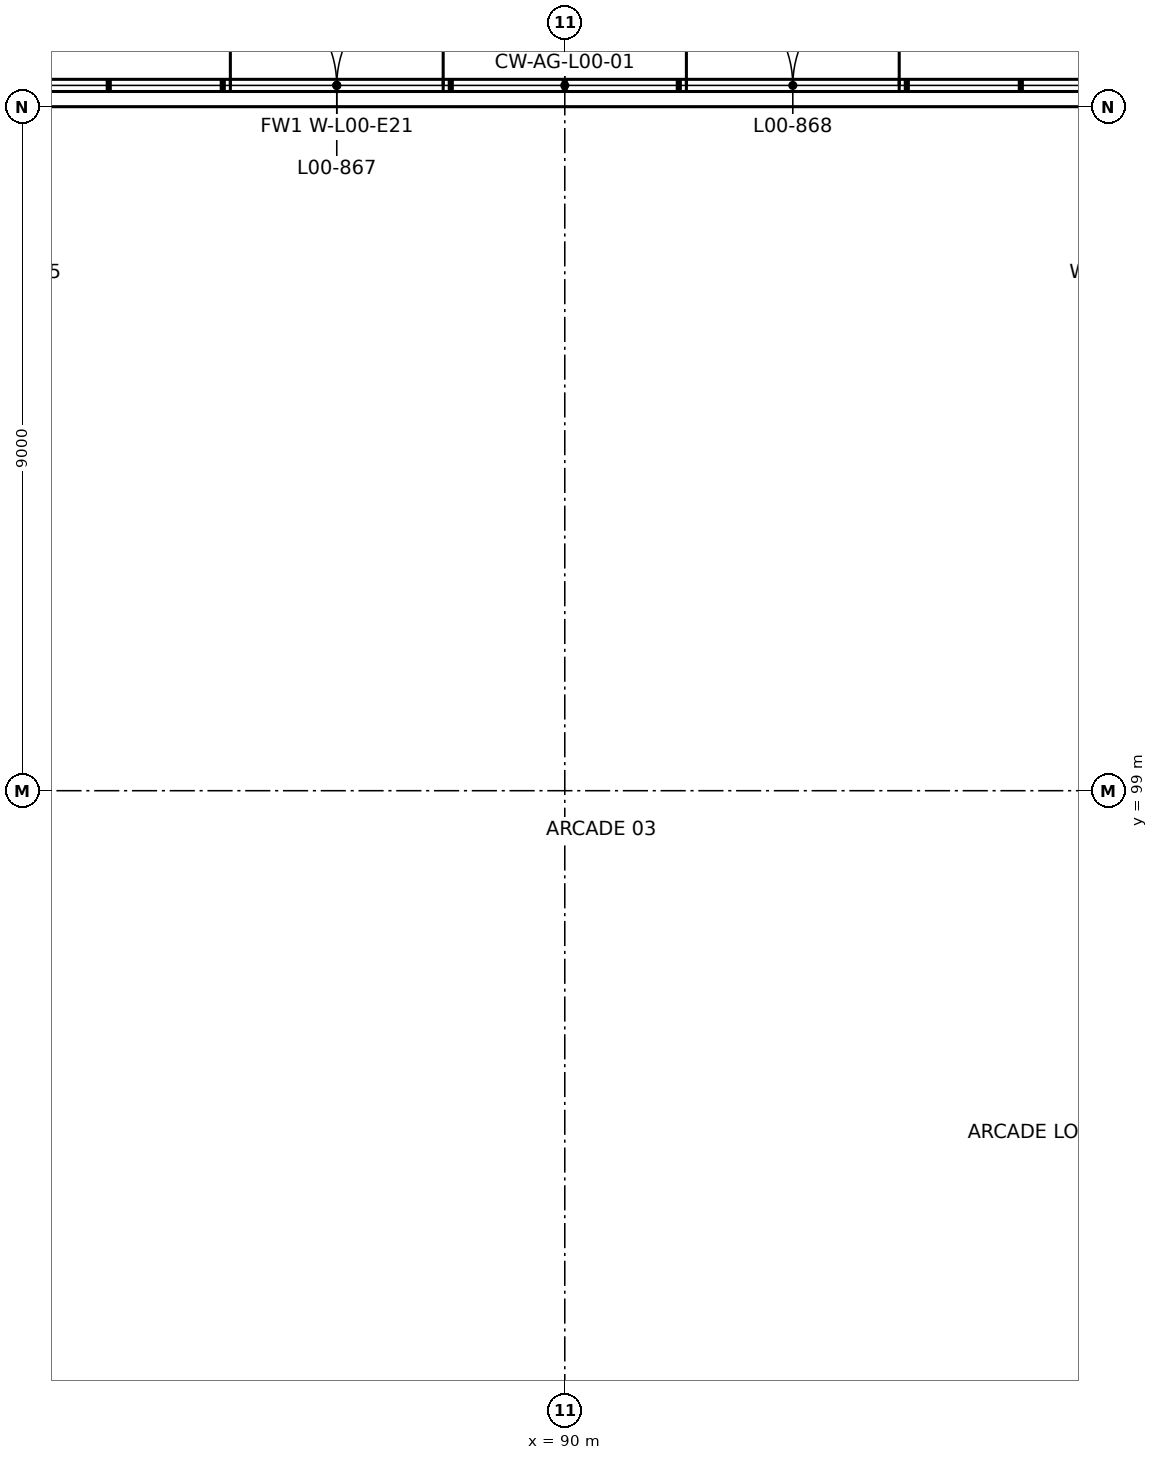
"""IFC4 building model, lengths in metres.
Left out: names, types, materials, properties, quantities, classifications, styles, units other than length and angle.
Written with IfcOpenShell. Run it as: python <this file> out.ifc"""

import sys

from ifc_helpers import new_model, si_unit, direction, frame, frame_2d, origin, place, context, subcontext, project, spatial, rectangle, extrude, element, fill, save


model = new_model("IFC4")
c1 = context("Model", 3, precision=1e-05, world=origin(), true_north=direction((0.0, 1.0)))
c2 = subcontext(c1, "Body", "Model", "MODEL_VIEW")
j1 = project(units=[si_unit("LENGTHUNIT", "METRE"), si_unit("PLANEANGLEUNIT", "RADIAN")], contexts=[c1])
p1 = place(None, origin())
s1 = spatial("IfcSite", under=j1, at=p1, CompositionType="ELEMENT")
p2 = place(p1, origin())
s2 = spatial("IfcBuilding", under=s1, at=p2, CompositionType="ELEMENT")
p3 = place(p2, origin())
s3 = spatial("IfcBuildingStorey", under=s2, at=p3, CompositionType="ELEMENT", Elevation=0.0)
p4 = place(p3, frame((85.53, 108.28, 0.0), z_axis=(0.0, 0.0, 1.0), x_axis=(1.0, 0.0, 0.0)))
e1 = element("IfcWall", 1, at=p4, inside=s3, PredefinedType="STANDARD", context=c2, shape_type="SweptSolid", body=[
    extrude(rectangle(XDim=2.94, YDim=0.12, at=frame_2d((1.47, 0.0))), origin(), (0.0, 0.0, 1.0), 2.97),
])
p5 = place(p4, frame((0.07, 0.0, 0.0)))
e2 = element("IfcOpeningElement", 2, at=p5, cuts=e1, PredefinedType="OPENING", context=c2, shape_type="SweptSolid", body=[
    extrude(rectangle(XDim=2.8, YDim=2.4, at=frame_2d((1.4, 1.2))), frame((0.0, 0.07, 0.0), z_axis=(0.0, -1.0, 0.0), x_axis=(1.0, 0.0, 0.0)), (0.0, 0.0, 1.0), 0.14),
])
p6 = place(p3, frame((91.53, 108.28, 0.0), z_axis=(0.0, 0.0, 1.0), x_axis=(1.0, 0.0, 0.0)))
e3 = element("IfcWall", 3, at=p6, inside=s3, PredefinedType="STANDARD", context=c2, shape_type="SweptSolid", body=[
    extrude(rectangle(XDim=2.94, YDim=0.12, at=frame_2d((1.47, 0.0))), origin(), (0.0, 0.0, 1.0), 2.97),
])
p7 = place(p6, frame((0.07, 0.0, 0.0)))
e4 = element("IfcOpeningElement", 4, at=p7, cuts=e3, PredefinedType="OPENING", context=c2, shape_type="SweptSolid", body=[
    extrude(rectangle(XDim=2.8, YDim=2.4, at=frame_2d((1.4, 1.2))), frame((0.0, 0.07, 0.0), z_axis=(0.0, -1.0, 0.0), x_axis=(1.0, 0.0, 0.0)), (0.0, 0.0, 1.0), 0.14),
])
p8 = place(p5, origin())
e5 = element("IfcDoor", 5, at=p8, inside=s3, OperationType="DOUBLE_DOOR_SINGLE_SWING", PredefinedType="DOOR", context=c2, shape_type="SweptSolid", body=[
    extrude(rectangle(XDim=2.8, YDim=2.4, at=frame_2d((1.4, 1.2))), frame((0.0, 0.025, 0.0), z_axis=(0.0, -1.0, 0.0), x_axis=(1.0, 0.0, 0.0)), (0.0, 0.0, 1.0), 0.05),
])
fill(e2, e5)
p9 = place(p7, origin())
e6 = element("IfcDoor", 6, at=p9, inside=s3, OperationType="DOUBLE_DOOR_SINGLE_SWING", PredefinedType="DOOR", context=c2, shape_type="SweptSolid", body=[
    extrude(rectangle(XDim=2.8, YDim=2.4, at=frame_2d((1.4, 1.2))), frame((0.0, 0.025, 0.0), z_axis=(0.0, -1.0, 0.0), x_axis=(1.0, 0.0, 0.0)), (0.0, 0.0, 1.0), 0.05),
])
fill(e4, e6)
save(model, sys.argv[1])
